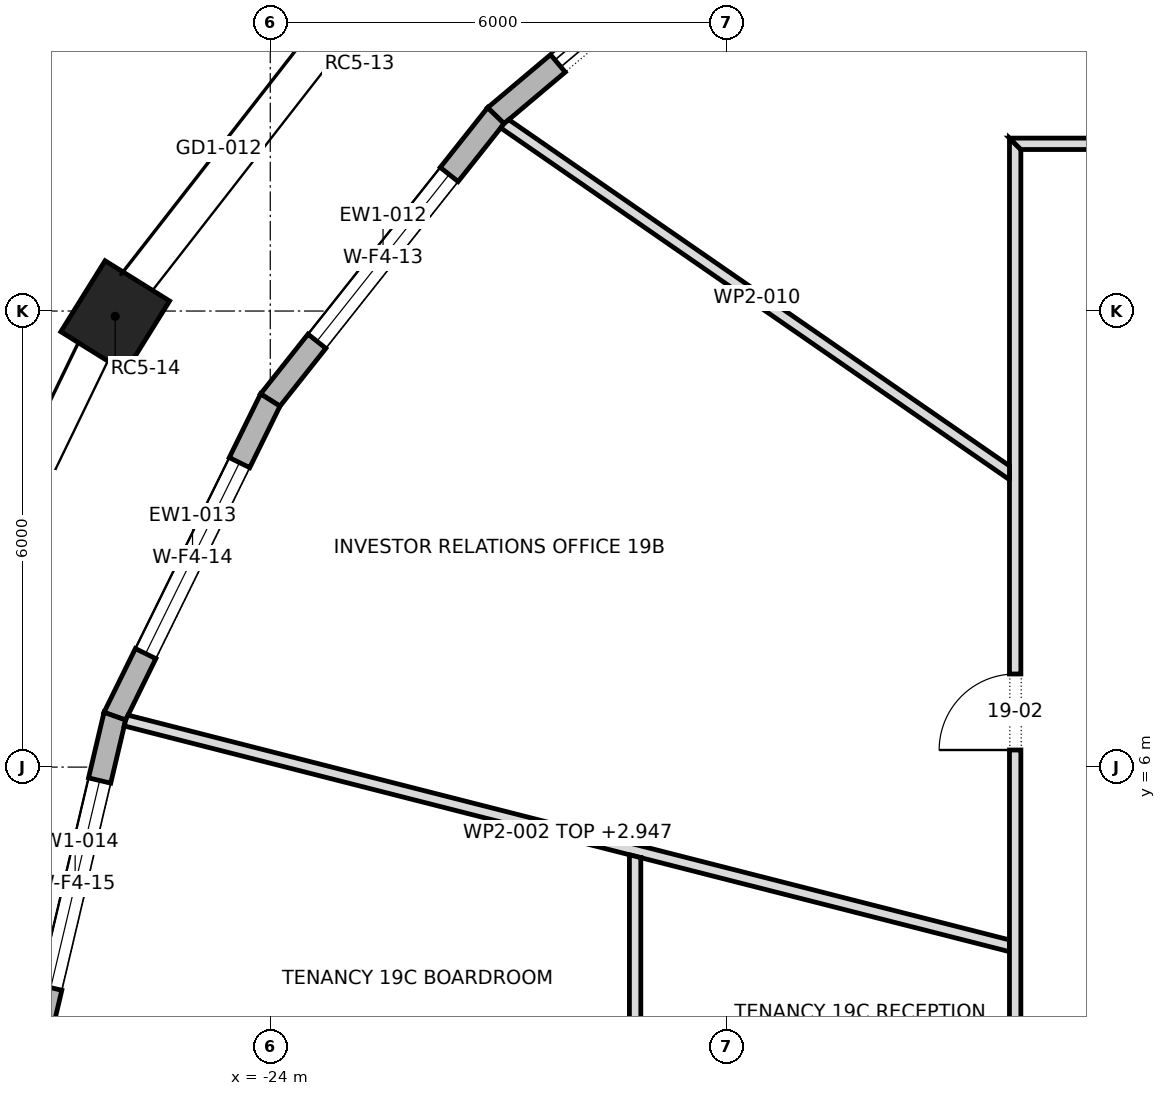
"""IFC4 building model, lengths in metres.
Left out: names, types, materials, properties, quantities, classifications, styles, units other than length and angle.
Written with IfcOpenShell. Run it as: python <this file> out.ifc"""

import sys

from ifc_helpers import new_model, si_unit, direction, frame, frame_2d, origin, origin_2d, place, context, subcontext, project, spatial, polyline, rectangle, outline, extrude, element, fill, save


model = new_model("IFC4")
c1 = context("Model", 3, precision=1e-05, world=origin(), true_north=direction((0.0, 1.0)))
c2 = subcontext(c1, "Body", "Model", "MODEL_VIEW")
j1 = project(units=[si_unit("LENGTHUNIT", "METRE"), si_unit("PLANEANGLEUNIT", "RADIAN")], contexts=[c1])
p1 = place(None, origin())
s1 = spatial("IfcSite", under=j1, at=p1, CompositionType="ELEMENT")
p2 = place(p1, origin())
s2 = spatial("IfcBuilding", under=s1, at=p2, CompositionType="ELEMENT")
p3 = place(p2, frame((0.0, 0.0, 276.3)))
s3 = spatial("IfcBuildingStorey", under=s2, at=p3, CompositionType="ELEMENT", Elevation=276.3)
for number, where, z_axis, x_axis in (
    (1, (-22.824, 16.055, 0.0), (0.0, 0.0, 1.0), (-0.692, -0.722, 0.0)),
    (2, (-26.04, 11.93, 0.0), (0.0, 0.0, 1.0), (-0.529, -0.849, 0.0)),
):
    element("IfcColumn", number, at=place(p3, frame(where, z_axis=z_axis, x_axis=x_axis)), inside=s3, PredefinedType="COLUMN", context=c2, shape_type="SweptSolid", body=[
        extrude(rectangle(XDim=1.1, YDim=1.0, at=origin_2d()), origin(), (0.0, 0.0, 1.0), 4.0),
    ])
p4 = place(p3, frame((-17.258, 17.75, 0.0), z_axis=(0.0, 0.0, 1.0), x_axis=(-0.764832940795, -0.644228664897, 0.0)))
e3 = element("IfcWall", 3, at=p4, inside=s3, PredefinedType="STANDARD", context=c2, shape_type="SweptSolid", body=[
    extrude(outline(polyline([(-0.014, -0.15), (4.95, -0.15), (4.92, 0.15), (0.014, 0.15), (-0.014, -0.15)])), origin(), (0.0, 0.0, 1.0), 3.7),
])
p5 = place(p4, frame((1.068, 0.0, 0.0)))
e4 = element("IfcOpeningElement", 4, at=p5, cuts=e3, PredefinedType="OPENING", context=c2, shape_type="SweptSolid", body=[
    extrude(rectangle(XDim=2.8, YDim=3.25, at=frame_2d((1.4, 1.625))), frame((0.0, 0.162, 0.0), z_axis=(0.0, -1.0, 0.0), x_axis=(1.0, 0.0, 0.0)), (0.0, 0.0, 1.0), 0.324),
])
p6 = place(p3, frame((-21.032, 14.57, 0.0), z_axis=(0.0, 0.0, 1.0), x_axis=(-0.621434755851, -0.783465917715, 0.0)))
e5 = element("IfcWall", 5, at=p6, inside=s3, PredefinedType="STANDARD", context=c2, shape_type="SweptSolid", body=[
    extrude(outline(polyline([(-0.015, -0.15), (4.791, -0.15), (4.759, 0.15), (0.015, 0.15), (-0.015, -0.15)])), origin(), (0.0, 0.0, 1.0), 3.7),
])
p7 = place(p6, frame((0.987, 0.0, 0.6)))
e6 = element("IfcOpeningElement", 6, at=p7, cuts=e5, PredefinedType="OPENING", context=c2, shape_type="SweptSolid", body=[
    extrude(rectangle(XDim=2.8, YDim=2.65, at=frame_2d((1.4, 1.325))), frame((0.0, 0.162, 0.0), z_axis=(0.0, -1.0, 0.0), x_axis=(1.0, 0.0, 0.0)), (0.0, 0.0, 1.0), 0.324),
])
p8 = place(p3, frame((-24.0, 10.829, 0.0), z_axis=(0.0, 0.0, 1.0), x_axis=(-0.441261940724, -0.897378348117, 0.0)))
e7 = element("IfcWall", 7, at=p8, inside=s3, PredefinedType="STANDARD", context=c2, shape_type="SweptSolid", body=[
    extrude(outline(polyline([(-0.016, -0.15), (4.652, -0.15), (4.618, 0.15), (0.016, 0.15), (-0.016, -0.15)])), origin(), (0.0, 0.0, 1.0), 3.7),
])
p9 = place(p8, frame((0.917, 0.0, 0.6)))
e8 = element("IfcOpeningElement", 8, at=p9, cuts=e7, PredefinedType="OPENING", context=c2, shape_type="SweptSolid", body=[
    extrude(rectangle(XDim=2.8, YDim=2.65, at=frame_2d((1.4, 1.325))), frame((0.0, 0.162, 0.0), z_axis=(0.0, -1.0, 0.0), x_axis=(1.0, 0.0, 0.0)), (0.0, 0.0, 1.0), 0.324),
])
p10 = place(p3, frame((-26.045, 6.67, 0.0), z_axis=(0.0, 0.0, 1.0), x_axis=(-0.22983372436, -0.973229910734, 0.0)))
e9 = element("IfcWall", 9, at=p10, inside=s3, PredefinedType="STANDARD", context=c2, shape_type="SweptSolid", body=[
    extrude(outline(polyline([(-0.017, -0.15), (4.557, -0.15), (4.521, 0.15), (0.017, 0.15), (-0.017, -0.15)])), origin(), (0.0, 0.0, 1.0), 3.7),
])
p11 = place(p10, frame((0.869, 0.0, 0.6)))
e10 = element("IfcOpeningElement", 10, at=p11, cuts=e9, PredefinedType="OPENING", context=c2, shape_type="SweptSolid", body=[
    extrude(rectangle(XDim=2.8, YDim=2.65, at=frame_2d((1.4, 1.325))), frame((0.0, 0.162, 0.0), z_axis=(0.0, -1.0, 0.0), x_axis=(1.0, 0.0, 0.0)), (0.0, 0.0, 1.0), 0.324),
])
p12 = place(p3, frame((-25.902, 6.614, 0.0), z_axis=(0.0, 0.0, 1.0), x_axis=(0.968990601513, -0.247097580277, 0.0)))
e11 = element("IfcWall", 11, at=p12, inside=s3, PredefinedType="PARTITIONING", context=c2, shape_type="SweptSolid", body=[
    extrude(outline(polyline([(0.0, -0.075), (1.752, -0.075), (3.504, -0.075), (5.256, -0.075), (7.008, -0.075), (7.013, -0.074), (7.013, -0.075), (8.682, -0.075), (10.35, -0.075), (12.019, -0.075), (11.98, 0.075), (9.986, 0.075), (7.991, 0.075), (5.997, 0.075), (4.002, 0.075), (2.008, 0.075), (0.013, 0.075), (0.0, 0.012), (0.0, -0.075)])), origin(), (0.0, 0.0, 1.0), 2.947),
])
p13 = place(p3, frame((-19.2, -1.59, 0.0), z_axis=(0.0, 0.0, 1.0), x_axis=(0.0, 1.0, 0.0)))
e12 = element("IfcWall", 12, at=p13, inside=s3, PredefinedType="PARTITIONING", context=c2, shape_type="SweptSolid", body=[
    extrude(outline(polyline([(0.0, -0.075), (0.81, -0.075), (0.91, -0.075), (2.74, -0.075), (4.569, -0.075), (6.399, -0.075), (6.437, 0.074), (6.437, 0.075), (4.845, 0.075), (3.253, 0.075), (1.661, 0.075), (0.069, 0.075), (0.07, 0.062), (0.0, 0.057), (0.0, 0.05), (0.0, 0.05), (0.0, -0.05), (0.0, -0.05), (0.0, -0.075)])), origin(), (0.0, 0.0, 1.0), 3.7),
])
p14 = place(p13, frame((3.18, 0.0, 0.0)))
e13 = element("IfcOpeningElement", 13, at=p14, cuts=e12, PredefinedType="OPENING", context=c2, shape_type="SweptSolid", body=[
    extrude(rectangle(XDim=1.0, YDim=2.1, at=frame_2d((0.5, 1.05))), frame((0.0, 0.087, 0.0), z_axis=(0.0, -1.0, 0.0), x_axis=(1.0, 0.0, 0.0)), (0.0, 0.0, 1.0), 0.174),
])
p15 = place(p3, frame((-14.2, -14.275, 0.0), z_axis=(0.0, 0.0, 1.0), x_axis=(0.0, 1.0, 0.0)))
e14 = element("IfcWall", 14, at=p15, inside=s3, PredefinedType="PARTITIONING", context=c2, shape_type="SweptSolid", body=[
    extrude(outline(polyline([(0.15, -0.075), (2.033, -0.075), (3.917, -0.075), (5.8, -0.075), (7.683, -0.075), (9.567, -0.075), (11.45, -0.075), (13.333, -0.075), (15.217, -0.075), (17.1, -0.075), (18.983, -0.075), (20.866, -0.075), (22.75, -0.075), (24.633, -0.075), (26.517, -0.075), (28.4, -0.075), (28.55, 0.075), (28.55, 0.075), (26.646, 0.075), (24.743, 0.075), (22.84, 0.075), (20.937, 0.075), (19.033, 0.075), (17.13, 0.075), (15.227, 0.075), (13.323, 0.075), (11.42, 0.075), (9.517, 0.075), (7.613, 0.075), (5.71, 0.075), (3.807, 0.075), (1.903, 0.075), (0.0, 0.075), (0.15, -0.075)])), origin(), (0.0, 0.0, 1.0), 3.7),
])
p16 = place(p15, frame((20.5, 0.0, 0.0)))
e15 = element("IfcOpeningElement", 15, at=p16, cuts=e14, PredefinedType="OPENING", context=c2, shape_type="SweptSolid", body=[
    extrude(rectangle(XDim=1.0, YDim=2.1, at=frame_2d((0.5, 1.05))), frame((0.0, 0.087, 0.0), z_axis=(0.0, -1.0, 0.0), x_axis=(1.0, 0.0, 0.0)), (0.0, 0.0, 1.0), 0.174),
])
p17 = place(p15, frame((11.595, 0.0, 0.0)))
e16 = element("IfcOpeningElement", 16, at=p17, cuts=e14, PredefinedType="OPENING", context=c2, shape_type="SweptSolid", body=[
    extrude(rectangle(XDim=1.0, YDim=2.1, at=frame_2d((0.5, 1.05))), frame((0.0, 0.087, 0.0), z_axis=(0.0, -1.0, 0.0), x_axis=(1.0, 0.0, 0.0)), (0.0, 0.0, 1.0), 0.174),
])
p18 = place(p15, frame((15.225, 0.0, 0.0)))
e17 = element("IfcOpeningElement", 17, at=p18, cuts=e14, PredefinedType="OPENING", context=c2, shape_type="SweptSolid", body=[
    extrude(rectangle(XDim=1.0, YDim=2.1, at=frame_2d((0.5, 1.05))), frame((0.0, 0.087, 0.0), z_axis=(0.0, -1.0, 0.0), x_axis=(1.0, 0.0, 0.0)), (0.0, 0.0, 1.0), 0.174),
])
p19 = place(p15, frame((4.86, 0.0, 0.0)))
e18 = element("IfcOpeningElement", 18, at=p19, cuts=e14, PredefinedType="OPENING", context=c2, shape_type="SweptSolid", body=[
    extrude(rectangle(XDim=1.0, YDim=2.1, at=frame_2d((0.5, 1.05))), frame((0.0, 0.087, 0.0), z_axis=(0.0, -1.0, 0.0), x_axis=(1.0, 0.0, 0.0)), (0.0, 0.0, 1.0), 0.174),
])
p20 = place(p3, frame((-14.232, 9.843, 0.0), z_axis=(0.0, 0.0, 1.0), x_axis=(-0.822495571588, 0.56877151363, 0.0)))
e19 = element("IfcWall", 19, at=p20, inside=s3, PredefinedType="PARTITIONING", context=c2, shape_type="SweptSolid", body=[
    extrude(outline(polyline([(0.104, -0.075), (1.705, -0.075), (3.307, -0.075), (4.908, -0.075), (6.51, -0.075), (8.112, -0.075), (8.133, 0.004), (8.137, 0.07), (8.137, 0.075), (6.51, 0.075), (4.883, 0.075), (3.255, 0.075), (1.627, 0.075), (0.0, 0.075), (0.0, 0.075), (0.104, -0.075)])), origin(), (0.0, 0.0, 1.0), 3.7),
])
p21 = place(p3, frame((-14.275, 14.2, 0.0), z_axis=(0.0, 0.0, 1.0), x_axis=(1.0, 0.0, 0.0)))
e20 = element("IfcWall", 20, at=p21, inside=s3, PredefinedType="PARTITIONING", context=c2, shape_type="SweptSolid", body=[
    extrude(outline(polyline([(0.15, -0.075), (2.033, -0.075), (3.917, -0.075), (5.8, -0.075), (7.683, -0.075), (9.567, -0.075), (11.45, -0.075), (13.333, -0.075), (15.217, -0.075), (17.1, -0.075), (18.983, -0.075), (20.866, -0.075), (22.75, -0.075), (24.633, -0.075), (26.517, -0.075), (28.4, -0.075), (28.55, 0.075), (28.55, 0.075), (26.646, 0.075), (24.743, 0.075), (22.84, 0.075), (20.937, 0.075), (19.033, 0.075), (17.13, 0.075), (15.227, 0.075), (13.323, 0.075), (11.42, 0.075), (9.517, 0.075), (7.613, 0.075), (5.71, 0.075), (3.807, 0.075), (1.903, 0.075), (0.0, 0.075), (0.15, -0.075)])), origin(), (0.0, 0.0, 1.0), 3.7),
])
p22 = place(p21, frame((5.845, 0.0, 0.0)))
e21 = element("IfcOpeningElement", 21, at=p22, cuts=e20, PredefinedType="OPENING", context=c2, shape_type="SweptSolid", body=[
    extrude(rectangle(XDim=1.0, YDim=2.1, at=frame_2d((0.5, 1.05))), frame((0.0, 0.087, 0.0), z_axis=(0.0, -1.0, 0.0), x_axis=(1.0, 0.0, 0.0)), (0.0, 0.0, 1.0), 0.174),
])
p23 = place(p21, frame((19.86, 0.0, 0.0)))
e22 = element("IfcOpeningElement", 22, at=p23, cuts=e20, PredefinedType="OPENING", context=c2, shape_type="SweptSolid", body=[
    extrude(rectangle(XDim=1.0, YDim=2.1, at=frame_2d((0.5, 1.05))), frame((0.0, 0.087, 0.0), z_axis=(0.0, -1.0, 0.0), x_axis=(1.0, 0.0, 0.0)), (0.0, 0.0, 1.0), 0.174),
])
p24 = place(p5, origin())
e23 = element("IfcDoor", 23, at=p24, inside=s3, OperationType="DOUBLE_DOOR_SLIDING", PredefinedType="DOOR", context=c2, shape_type="SweptSolid", body=[
    extrude(rectangle(XDim=2.8, YDim=3.25, at=frame_2d((1.4, 1.625))), frame((0.0, 0.025, 0.0), z_axis=(0.0, -1.0, 0.0), x_axis=(1.0, 0.0, 0.0)), (0.0, 0.0, 1.0), 0.05),
])
fill(e4, e23)
p25 = place(p7, origin())
e24 = element("IfcWindow", 24, at=p25, inside=s3, PartitioningType="DOUBLE_PANEL_VERTICAL", PredefinedType="WINDOW", context=c2, shape_type="SweptSolid", body=[
    extrude(rectangle(XDim=2.8, YDim=2.65, at=frame_2d((1.4, 1.325))), frame((0.0, 0.03, 0.0), z_axis=(0.0, -1.0, 0.0), x_axis=(1.0, 0.0, 0.0)), (0.0, 0.0, 1.0), 0.06),
])
fill(e6, e24)
p26 = place(p9, origin())
e25 = element("IfcWindow", 25, at=p26, inside=s3, PartitioningType="DOUBLE_PANEL_VERTICAL", PredefinedType="WINDOW", context=c2, shape_type="SweptSolid", body=[
    extrude(rectangle(XDim=2.8, YDim=2.65, at=frame_2d((1.4, 1.325))), frame((0.0, 0.03, 0.0), z_axis=(0.0, -1.0, 0.0), x_axis=(1.0, 0.0, 0.0)), (0.0, 0.0, 1.0), 0.06),
])
fill(e8, e25)
p27 = place(p11, origin())
e26 = element("IfcWindow", 26, at=p27, inside=s3, PartitioningType="DOUBLE_PANEL_VERTICAL", PredefinedType="WINDOW", context=c2, shape_type="SweptSolid", body=[
    extrude(rectangle(XDim=2.8, YDim=2.65, at=frame_2d((1.4, 1.325))), frame((0.0, 0.03, 0.0), z_axis=(0.0, -1.0, 0.0), x_axis=(1.0, 0.0, 0.0)), (0.0, 0.0, 1.0), 0.06),
])
fill(e10, e26)
p28 = place(p16, origin())
e27 = element("IfcDoor", 27, at=p28, inside=s3, OperationType="SINGLE_SWING_RIGHT", PredefinedType="DOOR", context=c2, shape_type="SweptSolid", body=[
    extrude(rectangle(XDim=1.0, YDim=2.1, at=frame_2d((0.5, 1.05))), frame((0.0, 0.025, 0.0), z_axis=(0.0, -1.0, 0.0), x_axis=(1.0, 0.0, 0.0)), (0.0, 0.0, 1.0), 0.05),
])
fill(e15, e27)
save(model, sys.argv[1])
